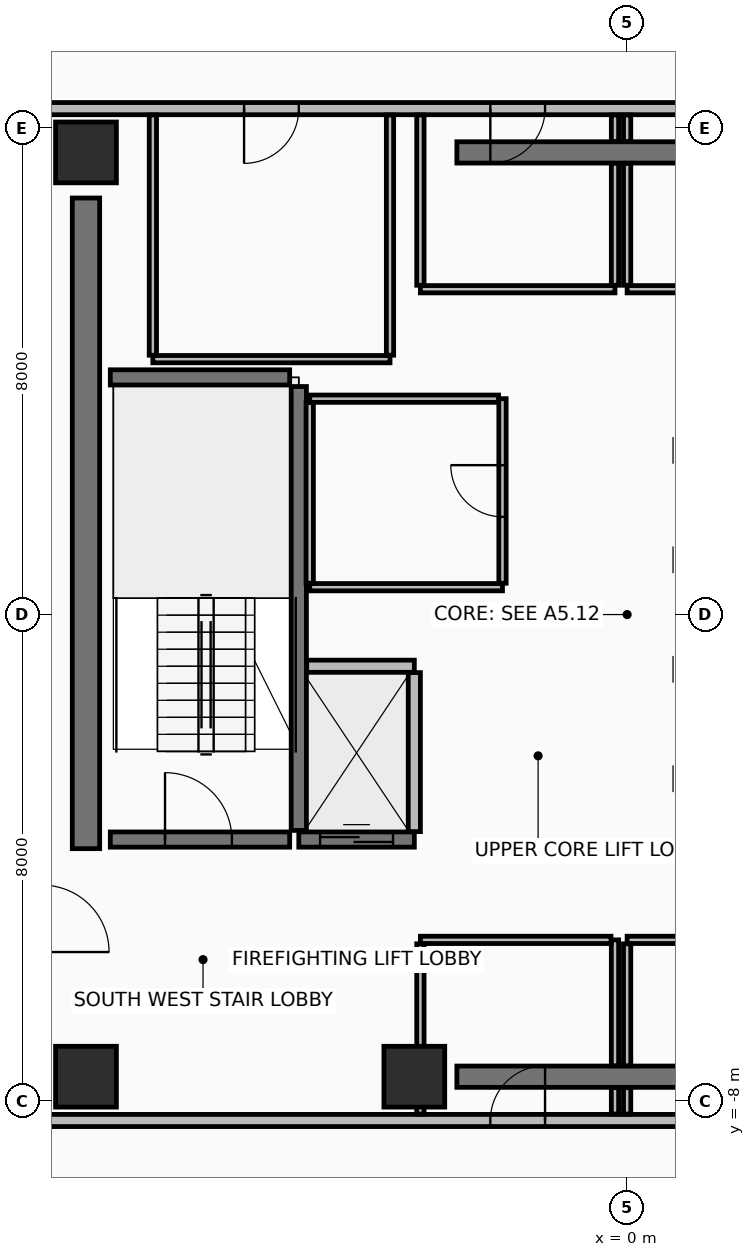
"""IFC4 building model, lengths in metres.
Left out: names, types, materials, properties, quantities, classifications, styles, units other than length and angle.
Written with IfcOpenShell. Run it as: python <this file> out.ifc"""

import sys

from ifc_helpers import new_model, si_unit, direction, frame, frame_2d, origin, origin_2d, place, context, subcontext, project, spatial, rectangle, extrude, element, fill, save


model = new_model("IFC4")
c1 = context("Model", 3, precision=1e-05, world=origin(), true_north=direction((0.0, 1.0)))
c2 = subcontext(c1, "Body", "Model", "MODEL_VIEW")
j1 = project(units=[si_unit("LENGTHUNIT", "METRE"), si_unit("PLANEANGLEUNIT", "RADIAN")], contexts=[c1])
p1 = place(None, origin())
s1 = spatial("IfcSite", under=j1, at=p1, CompositionType="ELEMENT")
p2 = place(p1, origin())
s2 = spatial("IfcBuilding", under=s1, at=p2, CompositionType="ELEMENT")
p3 = place(p2, frame((0.0, 0.0, 257.0)))
s3 = spatial("IfcBuildingStorey", under=s2, at=p3, CompositionType="ELEMENT", Elevation=257.0)
for number, where, z_axis, x_axis in (
    (1, (-8.9, -7.6, 0.0), (0.0, 0.0, 1.0), (1.0, 0.0, 0.0)),
    (2, (-3.5, -7.6, 0.0), (0.0, 0.0, 1.0), (1.0, 0.0, 0.0)),
    (3, (-8.9, 7.6, 0.0), (0.0, 0.0, 1.0), (1.0, 0.0, 0.0)),
):
    element("IfcColumn", number, at=place(p3, frame(where, z_axis=z_axis, x_axis=x_axis)), inside=s3, PredefinedType="COLUMN", context=c2, shape_type="SweptSolid", body=[
        extrude(rectangle(XDim=1.0, YDim=1.0, at=origin_2d()), origin(), (0.0, 0.0, 1.0), 3.6),
    ])
for number, where, z_axis, x_axis in (
    (4, (-2.8, -7.6, 0.0), (0.0, 0.0, 1.0), (1.0, 0.0, 0.0)),
    (5, (-2.8, 7.6, 0.0), (0.0, 0.0, 1.0), (1.0, 0.0, 0.0)),
):
    element("IfcWall", number, at=place(p3, frame(where, z_axis=z_axis, x_axis=x_axis)), inside=s3, PredefinedType="SHEAR", context=c2, shape_type="SweptSolid", body=[
        extrude(rectangle(XDim=5.38, YDim=0.35, at=frame_2d((2.69, 0.0))), origin(), (0.0, 0.0, 1.0), 3.42),
    ])
p4 = place(p3, frame((-8.9, -3.85, 0.0), z_axis=(0.0, 0.0, 1.0), x_axis=(0.0, 1.0, 0.0)))
e6 = element("IfcWall", 6, at=p4, inside=s3, PredefinedType="SHEAR", context=c2, shape_type="SweptSolid", body=[
    extrude(rectangle(XDim=10.7, YDim=0.45, at=frame_2d((5.35, 0.0))), origin(), (0.0, 0.0, 1.0), 3.42),
])
p5 = place(p3, frame((-9.62, -8.32, 0.0), z_axis=(0.0, 0.0, 1.0), x_axis=(1.0, 0.0, 0.0)))
e7 = element("IfcWall", 7, at=p5, inside=s3, PredefinedType="PARTITIONING", context=c2, shape_type="SweptSolid", body=[
    extrude(rectangle(XDim=19.24, YDim=0.2, at=frame_2d((9.62, 0.0))), origin(), (0.0, 0.0, 1.0), 2.915),
])
p6 = place(p5, frame((7.37, 0.0, 0.0)))
e8 = element("IfcOpeningElement", 8, at=p6, cuts=e7, PredefinedType="OPENING", context=c2, shape_type="SweptSolid", body=[
    extrude(rectangle(XDim=0.9, YDim=2.1, at=frame_2d((0.45, 1.05))), frame((0.0, 0.11, 0.0), z_axis=(0.0, -1.0, 0.0), x_axis=(1.0, 0.0, 0.0)), (0.0, 0.0, 1.0), 0.22),
])
p7 = place(p5, frame((10.77, 0.0, 0.0)))
e9 = element("IfcOpeningElement", 9, at=p7, cuts=e7, PredefinedType="OPENING", context=c2, shape_type="SweptSolid", body=[
    extrude(rectangle(XDim=0.9, YDim=2.1, at=frame_2d((0.45, 1.05))), frame((0.0, 0.11, 0.0), z_axis=(0.0, -1.0, 0.0), x_axis=(1.0, 0.0, 0.0)), (0.0, 0.0, 1.0), 0.22),
])
p8 = place(p3, frame((9.62, 8.32, 0.0), z_axis=(0.0, 0.0, 1.0), x_axis=(-1.0, 0.0, 0.0)))
e10 = element("IfcWall", 10, at=p8, inside=s3, PredefinedType="PARTITIONING", context=c2, shape_type="SweptSolid", body=[
    extrude(rectangle(XDim=19.24, YDim=0.2, at=frame_2d((9.62, 0.0))), origin(), (0.0, 0.0, 1.0), 2.915),
])
p9 = place(p8, frame((10.97, 0.0, 0.0)))
e11 = element("IfcOpeningElement", 11, at=p9, cuts=e10, PredefinedType="OPENING", context=c2, shape_type="SweptSolid", body=[
    extrude(rectangle(XDim=0.9, YDim=2.1, at=frame_2d((0.45, 1.05))), frame((0.0, 0.11, 0.0), z_axis=(0.0, -1.0, 0.0), x_axis=(1.0, 0.0, 0.0)), (0.0, 0.0, 1.0), 0.22),
])
p10 = place(p8, frame((7.57, 0.0, 0.0)))
e12 = element("IfcOpeningElement", 12, at=p10, cuts=e10, PredefinedType="OPENING", context=c2, shape_type="SweptSolid", body=[
    extrude(rectangle(XDim=0.9, YDim=2.1, at=frame_2d((0.45, 1.05))), frame((0.0, 0.11, 0.0), z_axis=(0.0, -1.0, 0.0), x_axis=(1.0, 0.0, 0.0)), (0.0, 0.0, 1.0), 0.22),
])
p11 = place(p8, frame((15.02, 0.0, 0.0)))
e13 = element("IfcOpeningElement", 13, at=p11, cuts=e10, PredefinedType="OPENING", context=c2, shape_type="SweptSolid", body=[
    extrude(rectangle(XDim=0.9, YDim=2.1, at=frame_2d((0.45, 1.05))), frame((0.0, 0.11, 0.0), z_axis=(0.0, -1.0, 0.0), x_axis=(1.0, 0.0, 0.0)), (0.0, 0.0, 1.0), 0.22),
])
p12 = place(p3, frame((-5.4, -3.55, 0.0), z_axis=(0.0, 0.0, 1.0), x_axis=(0.0, 1.0, 0.0)))
e14 = element("IfcWall", 14, at=p12, inside=s3, PredefinedType="SHEAR", context=c2, shape_type="SweptSolid", body=[
    extrude(rectangle(XDim=7.3, YDim=0.25, at=frame_2d((3.65, 0.0))), origin(), (0.0, 0.0, 1.0), 3.42),
])
p13 = place(p3, frame((-8.5, -3.7, 0.0), z_axis=(0.0, 0.0, 1.0), x_axis=(1.0, 0.0, 0.0)))
e15 = element("IfcWall", 15, at=p13, inside=s3, PredefinedType="SHEAR", context=c2, shape_type="SweptSolid", body=[
    extrude(rectangle(XDim=2.95, YDim=0.25, at=frame_2d((1.475, 0.0))), origin(), (0.0, 0.0, 1.0), 3.42),
])
p14 = place(p13, frame((0.9, 0.0, 0.0)))
e16 = element("IfcOpeningElement", 16, at=p14, cuts=e15, PredefinedType="OPENING", context=c2, shape_type="SweptSolid", body=[
    extrude(rectangle(XDim=1.1, YDim=2.15, at=frame_2d((0.55, 1.075))), frame((0.0, 0.135, 0.0), z_axis=(0.0, -1.0, 0.0), x_axis=(1.0, 0.0, 0.0)), (0.0, 0.0, 1.0), 0.27),
])
p15 = place(p3, frame((-8.5, 3.9, 0.0), z_axis=(0.0, 0.0, 1.0), x_axis=(1.0, 0.0, 0.0)))
e17 = element("IfcWall", 17, at=p15, inside=s3, PredefinedType="SHEAR", context=c2, shape_type="SweptSolid", body=[
    extrude(rectangle(XDim=2.95, YDim=0.25, at=frame_2d((1.475, 0.0))), origin(), (0.0, 0.0, 1.0), 3.42),
])
p16 = place(p3, frame((-5.4, -3.7, 0.0), z_axis=(0.0, 0.0, 1.0), x_axis=(1.0, 0.0, 0.0)))
e18 = element("IfcWall", 18, at=p16, inside=s3, PredefinedType="SHEAR", context=c2, shape_type="SweptSolid", body=[
    extrude(rectangle(XDim=1.9, YDim=0.25, at=frame_2d((0.95, 0.0))), origin(), (0.0, 0.0, 1.0), 3.42),
])
p17 = place(p16, frame((0.35, 0.0, 0.0)))
e19 = element("IfcOpeningElement", 19, at=p17, cuts=e18, PredefinedType="OPENING", context=c2, shape_type="SweptSolid", body=[
    extrude(rectangle(XDim=1.2, YDim=2.2, at=frame_2d((0.6, 1.1))), frame((0.0, 0.135, 0.0), z_axis=(0.0, -1.0, 0.0), x_axis=(1.0, 0.0, 0.0)), (0.0, 0.0, 1.0), 0.27),
])
p18 = place(p3, frame((-5.27, -0.85, 0.0), z_axis=(0.0, 0.0, 1.0), x_axis=(1.0, 0.0, 0.0)))
e20 = element("IfcWall", 20, at=p18, inside=s3, PredefinedType="PARTITIONING", context=c2, shape_type="SweptSolid", body=[
    extrude(rectangle(XDim=1.77, YDim=0.2, at=frame_2d((0.885, 0.0))), origin(), (0.0, 0.0, 1.0), 3.42),
])
p19 = place(p3, frame((-3.5, -3.57, 0.0), z_axis=(0.0, 0.0, 1.0), x_axis=(0.0, 1.0, 0.0)))
e21 = element("IfcWall", 21, at=p19, inside=s3, PredefinedType="PARTITIONING", context=c2, shape_type="SweptSolid", body=[
    extrude(rectangle(XDim=2.615, YDim=0.2, at=frame_2d((1.308, 0.0))), origin(), (0.0, 0.0, 1.0), 3.42),
])
p20 = place(p3, frame((-5.22, 0.45, 0.0), z_axis=(0.0, 0.0, 1.0), x_axis=(1.0, 0.0, 0.0)))
e22 = element("IfcWall", 22, at=p20, inside=s3, PredefinedType="PARTITIONING", context=c2, shape_type="SweptSolid", body=[
    extrude(rectangle(XDim=3.17, YDim=0.12, at=frame_2d((1.585, 0.0))), origin(), (0.0, 0.0, 1.0), 3.42),
])
p21 = place(p3, frame((-2.05, 0.515, 0.0), z_axis=(0.0, 0.0, 1.0), x_axis=(0.0, 1.0, 0.0)))
e23 = element("IfcWall", 23, at=p21, inside=s3, PredefinedType="PARTITIONING", context=c2, shape_type="SweptSolid", body=[
    extrude(rectangle(XDim=3.035, YDim=0.12, at=frame_2d((1.518, 0.0))), origin(), (0.0, 0.0, 1.0), 3.42),
])
p22 = place(p21, frame((1.092, 0.0, 0.0)))
e24 = element("IfcOpeningElement", 24, at=p22, cuts=e23, PredefinedType="OPENING", context=c2, shape_type="SweptSolid", body=[
    extrude(rectangle(XDim=0.85, YDim=2.1, at=frame_2d((0.425, 1.05))), frame((0.0, 0.07, 0.0), z_axis=(0.0, -1.0, 0.0), x_axis=(1.0, 0.0, 0.0)), (0.0, 0.0, 1.0), 0.14),
])
p23 = place(p3, frame((-2.115, 3.55, 0.0), z_axis=(0.0, 0.0, 1.0), x_axis=(-1.0, 0.0, 0.0)))
e25 = element("IfcWall", 25, at=p23, inside=s3, PredefinedType="PARTITIONING", context=c2, shape_type="SweptSolid", body=[
    extrude(rectangle(XDim=3.105, YDim=0.12, at=frame_2d((1.552, 0.0))), origin(), (0.0, 0.0, 1.0), 3.42),
])
p24 = place(p3, frame((-5.22, 3.485, 0.0), z_axis=(0.0, 0.0, 1.0), x_axis=(0.0, -1.0, 0.0)))
e26 = element("IfcWall", 26, at=p24, inside=s3, PredefinedType="PARTITIONING", context=c2, shape_type="SweptSolid", body=[
    extrude(rectangle(XDim=2.97, YDim=0.12, at=frame_2d((1.485, 0.0))), origin(), (0.0, 0.0, 1.0), 3.42),
])
p25 = place(p3, frame((-0.2, -8.215, 0.0), z_axis=(0.0, 0.0, 1.0), x_axis=(0.0, 1.0, 0.0)))
e27 = element("IfcWall", 27, at=p25, inside=s3, PredefinedType="PARTITIONING", context=c2, shape_type="SweptSolid", body=[
    extrude(rectangle(XDim=0.435, YDim=0.12, at=frame_2d((0.218, 0.0))), origin(), (0.0, 0.0, 1.0), 2.715),
])
p26 = place(p3, frame((-0.2, -7.42, 0.0), z_axis=(0.0, 0.0, 1.0), x_axis=(0.0, 1.0, 0.0)))
e28 = element("IfcWall", 28, at=p26, inside=s3, PredefinedType="PARTITIONING", context=c2, shape_type="SweptSolid", body=[
    extrude(rectangle(XDim=2.07, YDim=0.12, at=frame_2d((1.035, 0.0))), origin(), (0.0, 0.0, 1.0), 2.715),
])
p27 = place(p3, frame((-0.265, -5.35, 0.0), z_axis=(0.0, 0.0, 1.0), x_axis=(-1.0, 0.0, 0.0)))
e29 = element("IfcWall", 29, at=p27, inside=s3, PredefinedType="PARTITIONING", context=c2, shape_type="SweptSolid", body=[
    extrude(rectangle(XDim=3.135, YDim=0.12, at=frame_2d((1.567, 0.0))), origin(), (0.0, 0.0, 1.0), 2.715),
])
p28 = place(p3, frame((-3.4, -5.415, 0.0), z_axis=(0.0, 0.0, 1.0), x_axis=(0.0, -1.0, 0.0)))
e30 = element("IfcWall", 30, at=p28, inside=s3, PredefinedType="PARTITIONING", context=c2, shape_type="SweptSolid", body=[
    extrude(rectangle(XDim=2.8, YDim=0.12, at=frame_2d((1.4, 0.0))), origin(), (0.0, 0.0, 1.0), 2.715),
])
p29 = place(p3, frame((3.135, -5.35, 0.0), z_axis=(0.0, 0.0, 1.0), x_axis=(-1.0, 0.0, 0.0)))
e31 = element("IfcWall", 31, at=p29, inside=s3, PredefinedType="PARTITIONING", context=c2, shape_type="SweptSolid", body=[
    extrude(rectangle(XDim=3.135, YDim=0.12, at=frame_2d((1.567, 0.0))), origin(), (0.0, 0.0, 1.0), 3.42),
])
p30 = place(p3, frame((0.0, -5.415, 0.0), z_axis=(0.0, 0.0, 1.0), x_axis=(0.0, -1.0, 0.0)))
e32 = element("IfcWall", 32, at=p30, inside=s3, PredefinedType="PARTITIONING", context=c2, shape_type="SweptSolid", body=[
    extrude(rectangle(XDim=2.005, YDim=0.12, at=frame_2d((1.002, 0.0))), origin(), (0.0, 0.0, 1.0), 2.715),
])
p31 = place(p3, frame((0.0, -7.78, 0.0), z_axis=(0.0, 0.0, 1.0), x_axis=(0.0, -1.0, 0.0)))
e33 = element("IfcWall", 33, at=p31, inside=s3, PredefinedType="PARTITIONING", context=c2, shape_type="SweptSolid", body=[
    extrude(rectangle(XDim=0.435, YDim=0.12, at=frame_2d((0.218, 0.0))), origin(), (0.0, 0.0, 1.0), 2.715),
])
p32 = place(p3, frame((-3.4, 5.35, 0.0), z_axis=(0.0, 0.0, 1.0), x_axis=(1.0, 0.0, 0.0)))
e34 = element("IfcWall", 34, at=p32, inside=s3, PredefinedType="PARTITIONING", context=c2, shape_type="SweptSolid", body=[
    extrude(rectangle(XDim=3.2, YDim=0.12, at=frame_2d((1.6, 0.0))), origin(), (0.0, 0.0, 1.0), 3.42),
])
p33 = place(p3, frame((-0.2, 5.415, 0.0), z_axis=(0.0, 0.0, 1.0), x_axis=(0.0, 1.0, 0.0)))
e35 = element("IfcWall", 35, at=p33, inside=s3, PredefinedType="PARTITIONING", context=c2, shape_type="SweptSolid", body=[
    extrude(rectangle(XDim=2.005, YDim=0.12, at=frame_2d((1.002, 0.0))), origin(), (0.0, 0.0, 1.0), 2.715),
])
p34 = place(p3, frame((-0.2, 7.78, 0.0), z_axis=(0.0, 0.0, 1.0), x_axis=(0.0, 1.0, 0.0)))
e36 = element("IfcWall", 36, at=p34, inside=s3, PredefinedType="PARTITIONING", context=c2, shape_type="SweptSolid", body=[
    extrude(rectangle(XDim=0.435, YDim=0.12, at=frame_2d((0.218, 0.0))), origin(), (0.0, 0.0, 1.0), 2.715),
])
p35 = place(p3, frame((-3.4, 8.215, 0.0), z_axis=(0.0, 0.0, 1.0), x_axis=(0.0, -1.0, 0.0)))
e37 = element("IfcWall", 37, at=p35, inside=s3, PredefinedType="PARTITIONING", context=c2, shape_type="SweptSolid", body=[
    extrude(rectangle(XDim=2.8, YDim=0.12, at=frame_2d((1.4, 0.0))), origin(), (0.0, 0.0, 1.0), 2.715),
])
p36 = place(p3, frame((0.0, 5.35, 0.0), z_axis=(0.0, 0.0, 1.0), x_axis=(1.0, 0.0, 0.0)))
e38 = element("IfcWall", 38, at=p36, inside=s3, PredefinedType="PARTITIONING", context=c2, shape_type="SweptSolid", body=[
    extrude(rectangle(XDim=3.2, YDim=0.12, at=frame_2d((1.6, 0.0))), origin(), (0.0, 0.0, 1.0), 2.715),
])
p37 = place(p3, frame((0.0, 8.215, 0.0), z_axis=(0.0, 0.0, 1.0), x_axis=(0.0, -1.0, 0.0)))
e39 = element("IfcWall", 39, at=p37, inside=s3, PredefinedType="PARTITIONING", context=c2, shape_type="SweptSolid", body=[
    extrude(rectangle(XDim=0.435, YDim=0.12, at=frame_2d((0.218, 0.0))), origin(), (0.0, 0.0, 1.0), 2.715),
])
p38 = place(p3, frame((0.0, 7.42, 0.0), z_axis=(0.0, 0.0, 1.0), x_axis=(0.0, -1.0, 0.0)))
e40 = element("IfcWall", 40, at=p38, inside=s3, PredefinedType="PARTITIONING", context=c2, shape_type="SweptSolid", body=[
    extrude(rectangle(XDim=2.005, YDim=0.12, at=frame_2d((1.002, 0.0))), origin(), (0.0, 0.0, 1.0), 2.715),
])
p39 = place(p3, frame((-7.8, 4.2, 0.0), z_axis=(0.0, 0.0, 1.0), x_axis=(1.0, 0.0, 0.0)))
e41 = element("IfcWall", 41, at=p39, inside=s3, PredefinedType="PARTITIONING", context=c2, shape_type="SweptSolid", body=[
    extrude(rectangle(XDim=3.9, YDim=0.12, at=frame_2d((1.95, 0.0))), origin(), (0.0, 0.0, 1.0), 3.42),
])
for number, where, z_axis, x_axis in (
    (42, (-3.9, 4.265, 0.0), (0.0, 0.0, 1.0), (0.0, 1.0, 0.0)),
    (43, (-7.8, 8.215, 0.0), (0.0, 0.0, 1.0), (0.0, -1.0, 0.0)),
):
    element("IfcWall", number, at=place(p3, frame(where, z_axis=z_axis, x_axis=x_axis)), inside=s3, PredefinedType="PARTITIONING", context=c2, shape_type="SweptSolid", body=[
        extrude(rectangle(XDim=3.95, YDim=0.12, at=frame_2d((1.975, 0.0))), origin(), (0.0, 0.0, 1.0), 2.715),
    ])
p40 = place(p3, frame((-8.331, -22.582, 0.0), z_axis=(0.0, 0.0, 1.0), x_axis=(-0.559190048569, 0.829039498203, 0.0)))
e44 = element("IfcWall", 44, at=p40, inside=s3, PredefinedType="PARTITIONING", context=c2, shape_type="SweptSolid", body=[
    extrude(rectangle(XDim=23.473, YDim=0.15, at=frame_2d((11.737, 0.0))), origin(), (0.0, 0.0, 1.0), 3.42),
])
p41 = place(p14, origin())
e45 = element("IfcDoor", 45, at=p41, inside=s3, OperationType="SINGLE_SWING_LEFT", PredefinedType="DOOR", context=c2, shape_type="SweptSolid", body=[
    extrude(rectangle(XDim=1.1, YDim=2.15, at=frame_2d((0.55, 1.075))), frame((0.0, 0.025, 0.0), z_axis=(0.0, -1.0, 0.0), x_axis=(1.0, 0.0, 0.0)), (0.0, 0.0, 1.0), 0.05),
])
fill(e16, e45)
p42 = place(p17, origin())
e46 = element("IfcDoor", 46, at=p42, inside=s3, OperationType="SLIDING_TO_RIGHT", PredefinedType="DOOR", context=c2, shape_type="SweptSolid", body=[
    extrude(rectangle(XDim=1.2, YDim=2.2, at=frame_2d((0.6, 1.1))), frame((0.0, 0.025, 0.0), z_axis=(0.0, -1.0, 0.0), x_axis=(1.0, 0.0, 0.0)), (0.0, 0.0, 1.0), 0.05),
])
fill(e19, e46)
p43 = place(p22, frame((0.85, 0.0, 0.0), z_axis=(0.0, 0.0, 1.0), x_axis=(-1.0, 0.0, 0.0)))
e47 = element("IfcDoor", 47, at=p43, inside=s3, OperationType="SINGLE_SWING_RIGHT", PredefinedType="DOOR", context=c2, shape_type="SweptSolid", body=[
    extrude(rectangle(XDim=0.85, YDim=2.1, at=frame_2d((0.425, 1.05))), frame((0.0, 0.025, 0.0), z_axis=(0.0, -1.0, 0.0), x_axis=(1.0, 0.0, 0.0)), (0.0, 0.0, 1.0), 0.05),
])
fill(e24, e47)
p44 = place(p6, frame((0.9, 0.0, 0.0), z_axis=(0.0, 0.0, 1.0), x_axis=(-1.0, 0.0, 0.0)))
e48 = element("IfcDoor", 48, at=p44, inside=s3, OperationType="SINGLE_SWING_LEFT", PredefinedType="DOOR", context=c2, shape_type="SweptSolid", body=[
    extrude(rectangle(XDim=0.9, YDim=2.1, at=frame_2d((0.45, 1.05))), frame((0.0, 0.025, 0.0), z_axis=(0.0, -1.0, 0.0), x_axis=(1.0, 0.0, 0.0)), (0.0, 0.0, 1.0), 0.05),
])
fill(e8, e48)
p45 = place(p9, frame((0.9, 0.0, 0.0), z_axis=(0.0, 0.0, 1.0), x_axis=(-1.0, 0.0, 0.0)))
e49 = element("IfcDoor", 49, at=p45, inside=s3, OperationType="SINGLE_SWING_LEFT", PredefinedType="DOOR", context=c2, shape_type="SweptSolid", body=[
    extrude(rectangle(XDim=0.9, YDim=2.1, at=frame_2d((0.45, 1.05))), frame((0.0, 0.025, 0.0), z_axis=(0.0, -1.0, 0.0), x_axis=(1.0, 0.0, 0.0)), (0.0, 0.0, 1.0), 0.05),
])
fill(e11, e49)
p46 = place(p11, frame((0.9, 0.0, 0.0), z_axis=(0.0, 0.0, 1.0), x_axis=(-1.0, 0.0, 0.0)))
e50 = element("IfcDoor", 50, at=p46, inside=s3, OperationType="SINGLE_SWING_LEFT", PredefinedType="DOOR", context=c2, shape_type="SweptSolid", body=[
    extrude(rectangle(XDim=0.9, YDim=2.1, at=frame_2d((0.45, 1.05))), frame((0.0, 0.025, 0.0), z_axis=(0.0, -1.0, 0.0), x_axis=(1.0, 0.0, 0.0)), (0.0, 0.0, 1.0), 0.05),
])
fill(e13, e50)
save(model, sys.argv[1])
